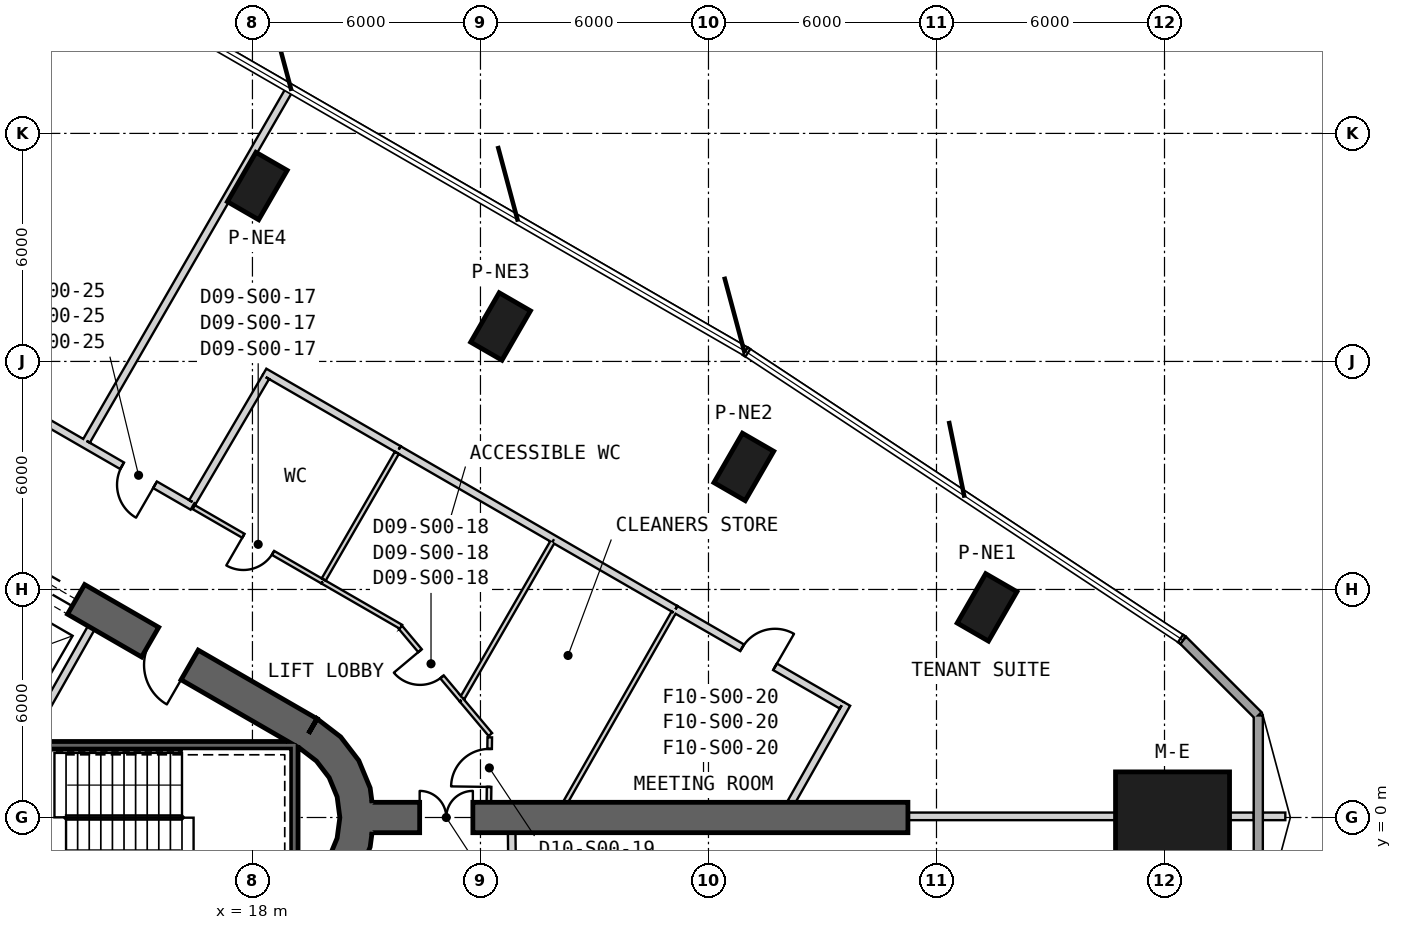
"""IFC4 building model, lengths in metres.
Left out: names, types, materials, properties, quantities, classifications, styles, units other than length and angle.
Written with IfcOpenShell. Run it as: python <this file> out.ifc"""

import sys

from ifc_helpers import new_model, si_unit, direction, frame, frame_2d, origin, origin_2d, place, context, subcontext, project, spatial, polyline, rectangle, outline, extrude, element, fill, save


model = new_model("IFC4")
c1 = context("Model", 3, precision=1e-05, world=origin(), true_north=direction((0.0, 1.0)))
c2 = subcontext(c1, "Body", "Model", "MODEL_VIEW")
j1 = project(units=[si_unit("LENGTHUNIT", "METRE"), si_unit("PLANEANGLEUNIT", "RADIAN")], contexts=[c1])
p1 = place(None, origin())
s1 = spatial("IfcSite", under=j1, at=p1, CompositionType="ELEMENT")
p2 = place(p1, origin())
s2 = spatial("IfcBuilding", under=s1, at=p2, CompositionType="ELEMENT")
p3 = place(p2, frame((0.0, 0.0, 45.5)))
s3 = spatial("IfcBuildingStorey", under=s2, at=p3, CompositionType="ELEMENT", Elevation=45.5)
p4 = place(p3, frame((42.211, 0.0, 0.0), z_axis=(0.0, 0.0, 1.0), x_axis=(1.0, 0.0, 0.0)))
e1 = element("IfcColumn", 1, at=p4, inside=s3, PredefinedType="COLUMN", context=c2, shape_type="SweptSolid", body=[
    extrude(rectangle(XDim=3.0, YDim=2.4, at=origin_2d()), origin(), (0.0, 0.0, 1.0), 4.1),
])
for number, where, z_axis, x_axis in (
    (2, (37.331, 5.528, 0.0), (0.0, 0.0, 1.0), (0.5, 0.866, 0.0)),
    (3, (30.93, 9.224, 0.0), (0.0, 0.0, 1.0), (0.5, 0.866, 0.0)),
    (4, (24.529, 12.92, 0.0), (0.0, 0.0, 1.0), (0.5, 0.866, 0.0)),
):
    element("IfcColumn", number, at=place(p3, frame(where, z_axis=z_axis, x_axis=x_axis)), inside=s3, PredefinedType="COLUMN", context=c2, shape_type="SweptSolid", body=[
        extrude(rectangle(XDim=1.5, YDim=0.95, at=origin_2d()), origin(), (0.0, 0.0, 1.0), 4.1),
    ])
p5 = place(p3, frame((18.128, 16.615, -0.3), z_axis=(0.0, 0.0, 1.0), x_axis=(0.5, 0.866025403784, 0.0)))
e5 = element("IfcColumn", 5, at=p5, inside=s3, PredefinedType="COLUMN", context=c2, shape_type="SweptSolid", body=[
    extrude(rectangle(XDim=1.5, YDim=0.95, at=origin_2d()), origin(), (0.0, 0.0, 1.0), 4.4),
])
p6 = place(p3, frame((19.475, 2.208, 0.0), z_axis=(0.0, 0.0, 1.0), x_axis=(-0.866028369851, 0.499994862586, 0.0)))
e6 = element("IfcWall", 6, at=p6, inside=s3, PredefinedType="SHEAR", context=c2, shape_type="SweptSolid", body=[
    extrude(rectangle(XDim=31.523, YDim=0.9, at=frame_2d((15.762, 0.0))), origin(), (0.0, 0.0, 1.0), 4.1),
])
p7 = place(p6, frame((7.062, 0.0, 0.0)))
e7 = element("IfcOpeningElement", 7, at=p7, cuts=e6, PredefinedType="OPENING", context=c2, shape_type="SweptSolid", body=[
    extrude(rectangle(XDim=1.2, YDim=2.4, at=frame_2d((0.6, 1.2))), frame((0.0, 0.46, 0.0), z_axis=(0.0, -1.0, 0.0), x_axis=(1.0, 0.0, 0.0)), (0.0, 0.0, 1.0), 0.92),
])
p8 = place(p6, frame((9.762, 0.0, 0.0)))
e8 = element("IfcOpeningElement", 8, at=p8, cuts=e6, PredefinedType="OPENING", context=c2, shape_type="SweptSolid", body=[
    extrude(rectangle(XDim=1.2, YDim=2.4, at=frame_2d((0.6, 1.2))), frame((0.0, 0.46, 0.0), z_axis=(0.0, -1.0, 0.0), x_axis=(1.0, 0.0, 0.0)), (0.0, 0.0, 1.0), 0.92),
])
p9 = place(p6, frame((12.462, 0.0, 0.0)))
e9 = element("IfcOpeningElement", 9, at=p9, cuts=e6, PredefinedType="OPENING", context=c2, shape_type="SweptSolid", body=[
    extrude(rectangle(XDim=1.2, YDim=2.4, at=frame_2d((0.6, 1.2))), frame((0.0, 0.46, 0.0), z_axis=(0.0, -1.0, 0.0), x_axis=(1.0, 0.0, 0.0)), (0.0, 0.0, 1.0), 0.92),
])
p10 = place(p6, frame((15.162, 0.0, 0.0)))
e10 = element("IfcOpeningElement", 10, at=p10, cuts=e6, PredefinedType="OPENING", context=c2, shape_type="SweptSolid", body=[
    extrude(rectangle(XDim=1.2, YDim=2.4, at=frame_2d((0.6, 1.2))), frame((0.0, 0.46, 0.0), z_axis=(0.0, -1.0, 0.0), x_axis=(1.0, 0.0, 0.0)), (0.0, 0.0, 1.0), 0.92),
])
p11 = place(p6, frame((17.862, 0.0, 0.0)))
e11 = element("IfcOpeningElement", 11, at=p11, cuts=e6, PredefinedType="OPENING", context=c2, shape_type="SweptSolid", body=[
    extrude(rectangle(XDim=1.2, YDim=2.4, at=frame_2d((0.6, 1.2))), frame((0.0, 0.46, 0.0), z_axis=(0.0, -1.0, 0.0), x_axis=(1.0, 0.0, 0.0)), (0.0, 0.0, 1.0), 0.92),
])
p12 = place(p6, frame((20.562, 0.0, 0.0)))
e12 = element("IfcOpeningElement", 12, at=p12, cuts=e6, PredefinedType="OPENING", context=c2, shape_type="SweptSolid", body=[
    extrude(rectangle(XDim=1.2, YDim=2.4, at=frame_2d((0.6, 1.2))), frame((0.0, 0.46, 0.0), z_axis=(0.0, -1.0, 0.0), x_axis=(1.0, 0.0, 0.0)), (0.0, 0.0, 1.0), 0.92),
])
p13 = place(p6, frame((23.262, 0.0, 0.0)))
e13 = element("IfcOpeningElement", 13, at=p13, cuts=e6, PredefinedType="OPENING", context=c2, shape_type="SweptSolid", body=[
    extrude(rectangle(XDim=1.2, YDim=2.4, at=frame_2d((0.6, 1.2))), frame((0.0, 0.46, 0.0), z_axis=(0.0, -1.0, 0.0), x_axis=(1.0, 0.0, 0.0)), (0.0, 0.0, 1.0), 0.92),
])
p14 = place(p6, frame((3.612, 0.0, 0.0)))
e14 = element("IfcOpeningElement", 14, at=p14, cuts=e6, PredefinedType="OPENING", context=c2, shape_type="SweptSolid", body=[
    extrude(rectangle(XDim=1.2, YDim=2.4, at=frame_2d((0.6, 1.2))), frame((0.0, 0.46, 0.0), z_axis=(0.0, -1.0, 0.0), x_axis=(1.0, 0.0, 0.0)), (0.0, 0.0, 1.0), 0.92),
])
p15 = place(p6, frame((26.712, 0.0, 0.0)))
e15 = element("IfcOpeningElement", 15, at=p15, cuts=e6, PredefinedType="OPENING", context=c2, shape_type="SweptSolid", body=[
    extrude(rectangle(XDim=1.2, YDim=2.4, at=frame_2d((0.6, 1.2))), frame((0.0, 0.46, 0.0), z_axis=(0.0, -1.0, 0.0), x_axis=(1.0, 0.0, 0.0)), (0.0, 0.0, 1.0), 0.92),
])
p16 = place(p3, origin())
e16 = element("IfcWall", 16, at=p16, inside=s3, PredefinedType="SHEAR", context=c2, shape_type="SweptSolid", body=[
    extrude(outline(polyline([(19.7, -2.598), (20.321, -2.121), (20.798, -1.5), (21.098, -0.777), (21.2, 0.0), (21.098, 0.777), (20.798, 1.5), (20.321, 2.121), (19.7, 2.598), (19.25, 1.819), (19.685, 1.485), (20.019, 1.05), (20.229, 0.543), (20.3, 0.0), (20.229, -0.543), (20.019, -1.05), (19.685, -1.485), (19.25, -1.819), (19.7, -2.598)])), origin(), (0.0, 0.0, 1.0), 4.1),
])
p17 = place(p3, frame((21.15, 0.0, 0.0), z_axis=(0.0, 0.0, 1.0), x_axis=(1.0, 0.0, 0.0)))
e17 = element("IfcWall", 17, at=p17, inside=s3, PredefinedType="SHEAR", context=c2, shape_type="SweptSolid", body=[
    extrude(rectangle(XDim=14.098, YDim=0.8, at=frame_2d((7.049, 0.0))), origin(), (0.0, 0.0, 1.0), 4.1),
])
p18 = place(p17, frame((1.25, 0.0, 0.0)))
e18 = element("IfcOpeningElement", 18, at=p18, cuts=e17, PredefinedType="OPENING", context=c2, shape_type="SweptSolid", body=[
    extrude(rectangle(XDim=1.4, YDim=2.4, at=frame_2d((0.7, 1.2))), frame((0.0, 0.41, 0.0), z_axis=(0.0, -1.0, 0.0), x_axis=(1.0, 0.0, 0.0)), (0.0, 0.0, 1.0), 0.82),
])
p19 = place(p3, frame((44.468, -2.686, 0.0), z_axis=(0.0, 0.0, 1.0), x_axis=(0.0, 1.0, 0.0)))
e19 = element("IfcWall", 19, at=p19, inside=s3, PredefinedType="SOLIDWALL", context=c2, shape_type="SweptSolid", body=[
    extrude(rectangle(XDim=5.371, YDim=0.24, at=frame_2d((2.686, 0.0))), origin(), (0.0, 0.0, 1.0), 3.8),
])
p20 = place(p3, frame((44.468, 2.686, 0.0), z_axis=(0.0, 0.0, 1.0), x_axis=(-0.707106781187, 0.707106781187, 0.0)))
e20 = element("IfcWall", 20, at=p20, inside=s3, PredefinedType="SOLIDWALL", context=c2, shape_type="SweptSolid", body=[
    extrude(rectangle(XDim=2.801, YDim=0.24, at=frame_2d((1.4, 0.0))), origin(), (0.0, 0.0, 1.0), 3.8),
])
p21 = place(p3, frame((12.11, 2.073, 0.0), z_axis=(0.0, 0.0, 1.0), x_axis=(0.49196600604, 0.870614408852, 0.0)))
e21 = element("IfcWall", 21, at=p21, inside=s3, PredefinedType="PLUMBINGWALL", context=c2, shape_type="SweptSolid", body=[
    extrude(rectangle(XDim=3.35, YDim=0.2, at=frame_2d((1.675, 0.0))), origin(), (0.0, 0.0, 1.0), 3.8),
])
p22 = place(p3, frame((19.2, 1.9, -0.3), z_axis=(0.0, 0.0, 1.0), x_axis=(-1.0, 0.0, 0.0)))
e22 = element("IfcWall", 22, at=p22, inside=s3, PredefinedType="SHEAR", context=c2, shape_type="SweptSolid", body=[
    extrude(rectangle(XDim=8.1, YDim=0.2, at=frame_2d((4.05, 0.0))), origin(), (0.0, 0.0, 1.0), 4.1),
])
p23 = place(p3, frame((19.1, -2.0, -0.3), z_axis=(0.0, 0.0, 1.0), x_axis=(0.0, 1.0, 0.0)))
e23 = element("IfcWall", 23, at=p23, inside=s3, PredefinedType="SHEAR", context=c2, shape_type="SweptSolid", body=[
    extrude(rectangle(XDim=3.8, YDim=0.2, at=frame_2d((1.9, 0.0))), origin(), (0.0, 0.0, 1.0), 4.1),
])
p24 = place(p3, frame((16.423, 8.185, 0.0), z_axis=(0.0, 0.0, 1.0), x_axis=(-0.866026561282, 0.49999799515, 0.0)))
e24 = element("IfcWall", 24, at=p24, inside=s3, PredefinedType="PARTITIONING", context=c2, shape_type="SweptSolid", body=[
    extrude(rectangle(XDim=26.435, YDim=0.2, at=frame_2d((13.218, 0.0))), origin(), (0.0, 0.0, 1.0), 2.98),
])
p25 = place(p24, frame((14.356, 0.0, 0.0)))
e25 = element("IfcOpeningElement", 25, at=p25, cuts=e24, PredefinedType="OPENING", context=c2, shape_type="SweptSolid", body=[
    extrude(rectangle(XDim=1.0, YDim=2.1, at=frame_2d((0.5, 1.05))), frame((0.0, 0.11, 0.0), z_axis=(0.0, -1.0, 0.0), x_axis=(1.0, 0.0, 0.0)), (0.0, 0.0, 1.0), 0.22),
])
p26 = place(p24, frame((1.139, 0.0, 0.0)))
e26 = element("IfcOpeningElement", 26, at=p26, cuts=e24, PredefinedType="OPENING", context=c2, shape_type="SweptSolid", body=[
    extrude(rectangle(XDim=1.0, YDim=2.1, at=frame_2d((0.5, 1.05))), frame((0.0, 0.11, 0.0), z_axis=(0.0, -1.0, 0.0), x_axis=(1.0, 0.0, 0.0)), (0.0, 0.0, 1.0), 0.22),
])
p27 = place(p3, frame((21.909, 5.018, 0.0), z_axis=(0.0, 0.0, 1.0), x_axis=(-0.866054279967, 0.499949981648, 0.0)))
e27 = element("IfcWall", 27, at=p27, inside=s3, PredefinedType="PARTITIONING", context=c2, shape_type="SweptSolid", body=[
    extrude(rectangle(XDim=2.384, YDim=0.12, at=frame_2d((1.192, 0.0))), origin(), (0.0, 0.0, 1.0), 2.98),
])
p28 = place(p3, frame((19.845, 6.209, 0.0), z_axis=(0.0, 0.0, 1.0), x_axis=(-0.866002635216, 0.500039434245, 0.0)))
e28 = element("IfcWall", 28, at=p28, inside=s3, PredefinedType="PARTITIONING", context=c2, shape_type="SweptSolid", body=[
    extrude(rectangle(XDim=3.911, YDim=0.12, at=frame_2d((1.956, 0.0))), origin(), (0.0, 0.0, 1.0), 3.8),
])
p29 = place(p28, frame((1.506, 0.0, 0.0)))
e29 = element("IfcOpeningElement", 29, at=p29, cuts=e28, PredefinedType="OPENING", context=c2, shape_type="SweptSolid", body=[
    extrude(rectangle(XDim=0.9, YDim=2.1, at=frame_2d((0.45, 1.05))), frame((0.0, 0.07, 0.0), z_axis=(0.0, -1.0, 0.0), x_axis=(1.0, 0.0, 0.0)), (0.0, 0.0, 1.0), 0.14),
])
p30 = place(p3, frame((24.26, 2.184, 0.0), z_axis=(0.0, 0.0, 1.0), x_axis=(-0.642765036977, 0.766063383304, 0.0)))
e30 = element("IfcWall", 30, at=p30, inside=s3, PredefinedType="PARTITIONING", context=c2, shape_type="SweptSolid", body=[
    extrude(rectangle(XDim=1.18, YDim=0.12, at=frame_2d((0.59, 0.0))), origin(), (0.0, 0.0, 1.0), 3.8),
])
p31 = place(p3, frame((23.502, 3.088, 0.0), z_axis=(0.0, 0.0, 1.0), x_axis=(-0.642756581794, 0.766070477541, 0.0)))
e31 = element("IfcWall", 31, at=p31, inside=s3, PredefinedType="PARTITIONING", context=c2, shape_type="SweptSolid", body=[
    extrude(rectangle(XDim=2.499, YDim=0.12, at=frame_2d((1.249, 0.0))), origin(), (0.0, 0.0, 1.0), 2.88),
])
p32 = place(p31, frame((0.799, 0.0, 0.0)))
e32 = element("IfcOpeningElement", 32, at=p32, cuts=e31, PredefinedType="OPENING", context=c2, shape_type="SweptSolid", body=[
    extrude(rectangle(XDim=0.9, YDim=2.1, at=frame_2d((0.45, 1.05))), frame((0.0, 0.07, 0.0), z_axis=(0.0, -1.0, 0.0), x_axis=(1.0, 0.0, 0.0)), (0.0, 0.0, 1.0), 0.14),
])
p33 = place(p3, frame((24.222, 0.4, 0.0), z_axis=(0.0, 0.0, 1.0), x_axis=(0.013570178926, 0.999907920883, 0.0)))
e33 = element("IfcWall", 33, at=p33, inside=s3, PredefinedType="PARTITIONING", context=c2, shape_type="SweptSolid", body=[
    extrude(rectangle(XDim=1.709, YDim=0.12, at=frame_2d((0.854, 0.0))), origin(), (0.0, 0.0, 1.0), 3.8),
])
p34 = place(p33, frame((0.405, 0.0, 0.0)))
e34 = element("IfcOpeningElement", 34, at=p34, cuts=e33, PredefinedType="OPENING", context=c2, shape_type="SweptSolid", body=[
    extrude(rectangle(XDim=1.0, YDim=2.1, at=frame_2d((0.5, 1.05))), frame((0.0, 0.07, 0.0), z_axis=(0.0, -1.0, 0.0), x_axis=(1.0, 0.0, 0.0)), (0.0, 0.0, 1.0), 0.14),
])
p35 = place(p3, frame((24.848, -2.535, 0.0), z_axis=(0.0, 0.0, 1.0), x_axis=(-0.012347560796, 0.999923765965, 0.0)))
e35 = element("IfcWall", 35, at=p35, inside=s3, PredefinedType="PARTITIONING", context=c2, shape_type="SweptSolid", body=[
    extrude(rectangle(XDim=2.135, YDim=0.2, at=frame_2d((1.068, 0.0))), origin(), (0.0, 0.0, 1.0), 3.8),
])
p36 = place(p3, frame((13.635, 9.911, 0.0), z_axis=(0.0, 0.0, 1.0), x_axis=(0.499942170756, 0.86605878894, 0.0)))
e36 = element("IfcWall", 36, at=p36, inside=s3, PredefinedType="PARTITIONING", context=c2, shape_type="SweptSolid", body=[
    extrude(rectangle(XDim=10.709, YDim=0.2, at=frame_2d((5.354, 0.0))), origin(), (0.0, 0.0, 1.0), 3.08),
])
p37 = place(p3, frame((45.179, 0.03, 0.0), z_axis=(0.0, 0.0, 1.0), x_axis=(-1.0, 0.0, 0.0)))
e37 = element("IfcWall", 37, at=p37, inside=s3, PredefinedType="PARTITIONING", context=c2, shape_type="SweptSolid", body=[
    extrude(rectangle(XDim=0.592, YDim=0.2, at=frame_2d((0.296, 0.0))), origin(), (0.0, 0.0, 1.0), 3.8),
])
p38 = place(p3, frame((44.347, 0.03, 0.0), z_axis=(0.0, 0.0, 1.0), x_axis=(-1.0, 0.0, 0.0)))
e38 = element("IfcWall", 38, at=p38, inside=s3, PredefinedType="PARTITIONING", context=c2, shape_type="SweptSolid", body=[
    extrude(rectangle(XDim=0.636, YDim=0.2, at=frame_2d((0.318, 0.0))), origin(), (0.0, 0.0, 1.0), 3.8),
])
p39 = place(p3, frame((40.711, 0.03, 0.0), z_axis=(0.0, 0.0, 1.0), x_axis=(-1.0, 0.0, 0.0)))
e39 = element("IfcWall", 39, at=p39, inside=s3, PredefinedType="PARTITIONING", context=c2, shape_type="SweptSolid", body=[
    extrude(rectangle(XDim=5.463, YDim=0.2, at=frame_2d((2.731, 0.0))), origin(), (0.0, 0.0, 1.0), 3.37),
])
p40 = place(p3, frame((18.315, 11.723, 0.0), z_axis=(0.0, 0.0, 1.0), x_axis=(0.866048124097, -0.4999606452, 0.0)))
e40 = element("IfcWall", 40, at=p40, inside=s3, PredefinedType="PARTITIONING", context=c2, shape_type="SweptSolid", body=[
    extrude(rectangle(XDim=4.081, YDim=0.2, at=frame_2d((2.041, 0.0))), origin(), (0.0, 0.0, 1.0), 2.98),
])
p41 = place(p3, frame((21.85, 9.682, 0.0), z_axis=(0.0, 0.0, 1.0), x_axis=(0.866018431725, -0.500012075767, 0.0)))
e41 = element("IfcWall", 41, at=p41, inside=s3, PredefinedType="PARTITIONING", context=c2, shape_type="SweptSolid", body=[
    extrude(rectangle(XDim=4.719, YDim=0.2, at=frame_2d((2.359, 0.0))), origin(), (0.0, 0.0, 1.0), 2.98),
])
p42 = place(p3, frame((25.936, 7.323, 0.0), z_axis=(0.0, 0.0, 1.0), x_axis=(0.866035727774, -0.499982117899, 0.0)))
e42 = element("IfcWall", 42, at=p42, inside=s3, PredefinedType="PARTITIONING", context=c2, shape_type="SweptSolid", body=[
    extrude(rectangle(XDim=3.69, YDim=0.2, at=frame_2d((1.845, 0.0))), origin(), (0.0, 0.0, 1.0), 3.8),
])
p43 = place(p3, frame((29.132, 5.478, 0.0), z_axis=(0.0, 0.0, 1.0), x_axis=(0.866009287374, -0.500027913402, 0.0)))
e43 = element("IfcWall", 43, at=p43, inside=s3, PredefinedType="PARTITIONING", context=c2, shape_type="SweptSolid", body=[
    extrude(rectangle(XDim=5.051, YDim=0.2, at=frame_2d((2.525, 0.0))), origin(), (0.0, 0.0, 1.0), 2.88),
])
p44 = place(p43, frame((2.025, 0.0, 0.0)))
e44 = element("IfcOpeningElement", 44, at=p44, cuts=e43, PredefinedType="OPENING", context=c2, shape_type="SweptSolid", body=[
    extrude(rectangle(XDim=1.0, YDim=2.1, at=frame_2d((0.5, 1.05))), frame((0.0, 0.11, 0.0), z_axis=(0.0, -1.0, 0.0), x_axis=(1.0, 0.0, 0.0)), (0.0, 0.0, 1.0), 0.22),
])
p45 = place(p3, frame((18.351, 11.587, 0.0), z_axis=(0.0, 0.0, 1.0), x_axis=(-0.506482355277, -0.862250325482, 0.0)))
e45 = element("IfcWall", 45, at=p45, inside=s3, PredefinedType="PARTITIONING", context=c2, shape_type="SweptSolid", body=[
    extrude(rectangle(XDim=3.81, YDim=0.2, at=frame_2d((1.905, 0.0))), origin(), (0.0, 0.0, 1.0), 2.98),
])
p46 = place(p3, frame((32.177, 0.4, 0.0), z_axis=(0.0, 0.0, 1.0), x_axis=(0.492157292939, 0.870506288895, 0.0)))
e46 = element("IfcWall", 46, at=p46, inside=s3, PredefinedType="PARTITIONING", context=c2, shape_type="SweptSolid", body=[
    extrude(rectangle(XDim=2.975, YDim=0.2, at=frame_2d((1.488, 0.0))), origin(), (0.0, 0.0, 1.0), 3.8),
])
p47 = place(p3, frame((21.8, 9.596, 0.0), z_axis=(0.0, 0.0, 1.0), x_axis=(-0.500006057782, -0.866021906294, 0.0)))
e47 = element("IfcWall", 47, at=p47, inside=s3, PredefinedType="PARTITIONING", context=c2, shape_type="SweptSolid", body=[
    extrude(rectangle(XDim=3.85, YDim=0.12, at=frame_2d((1.925, 0.0))), origin(), (0.0, 0.0, 1.0), 3.8),
])
p48 = place(p3, frame((25.886, 7.236, 0.0), z_axis=(0.0, 0.0, 1.0), x_axis=(-0.500001678427, -0.866024434742, 0.0)))
e48 = element("IfcWall", 48, at=p48, inside=s3, PredefinedType="PARTITIONING", context=c2, shape_type="SweptSolid", body=[
    extrude(rectangle(XDim=4.718, YDim=0.12, at=frame_2d((2.359, 0.0))), origin(), (0.0, 0.0, 1.0), 2.88),
])
p49 = place(p3, frame((29.082, 5.391, 0.0), z_axis=(0.0, 0.0, 1.0), x_axis=(-0.495278409735, -0.868734307398, 0.0)))
e49 = element("IfcWall", 49, at=p49, inside=s3, PredefinedType="PARTITIONING", context=c2, shape_type="SweptSolid", body=[
    extrude(rectangle(XDim=5.746, YDim=0.12, at=frame_2d((2.873, 0.0))), origin(), (0.0, 0.0, 1.0), 2.88),
])
p50 = place(p29, origin())
e50 = element("IfcDoor", 50, at=p50, inside=s3, OperationType="SINGLE_SWING_LEFT", PredefinedType="NOTDEFINED", context=c2, shape_type="SweptSolid", body=[
    extrude(rectangle(XDim=0.9, YDim=2.1, at=frame_2d((0.45, 1.05))), frame((0.0, 0.025, 0.0), z_axis=(0.0, -1.0, 0.0), x_axis=(1.0, 0.0, 0.0)), (0.0, 0.0, 1.0), 0.05),
])
fill(e29, e50)
p51 = place(p32, origin())
e51 = element("IfcDoor", 51, at=p51, inside=s3, OperationType="SINGLE_SWING_RIGHT", PredefinedType="NOTDEFINED", context=c2, shape_type="SweptSolid", body=[
    extrude(rectangle(XDim=0.9, YDim=2.1, at=frame_2d((0.45, 1.05))), frame((0.0, 0.025, 0.0), z_axis=(0.0, -1.0, 0.0), x_axis=(1.0, 0.0, 0.0)), (0.0, 0.0, 1.0), 0.05),
])
fill(e32, e51)
p52 = place(p34, origin())
e52 = element("IfcDoor", 52, at=p52, inside=s3, OperationType="SINGLE_SWING_LEFT", PredefinedType="NOTDEFINED", context=c2, shape_type="SweptSolid", body=[
    extrude(rectangle(XDim=1.0, YDim=2.1, at=frame_2d((0.5, 1.05))), frame((0.0, 0.025, 0.0), z_axis=(0.0, -1.0, 0.0), x_axis=(1.0, 0.0, 0.0)), (0.0, 0.0, 1.0), 0.05),
])
fill(e34, e52)
p53 = place(p44, origin())
e53 = element("IfcDoor", 53, at=p53, inside=s3, OperationType="SINGLE_SWING_LEFT", PredefinedType="USERDEFINED", context=c2, shape_type="SweptSolid", body=[
    extrude(rectangle(XDim=1.0, YDim=2.1, at=frame_2d((0.5, 1.05))), frame((0.0, 0.025, 0.0), z_axis=(0.0, -1.0, 0.0), x_axis=(1.0, 0.0, 0.0)), (0.0, 0.0, 1.0), 0.05),
])
fill(e44, e53)
p54 = place(p26, origin())
e54 = element("IfcDoor", 54, at=p54, inside=s3, OperationType="SINGLE_SWING_RIGHT", PredefinedType="USERDEFINED", context=c2, shape_type="SweptSolid", body=[
    extrude(rectangle(XDim=1.0, YDim=2.1, at=frame_2d((0.5, 1.05))), frame((0.0, 0.025, 0.0), z_axis=(0.0, -1.0, 0.0), x_axis=(1.0, 0.0, 0.0)), (0.0, 0.0, 1.0), 0.05),
])
fill(e26, e54)
p55 = place(p7, origin())
e55 = element("IfcDoor", 55, at=p55, inside=s3, OperationType="SLIDING_TO_LEFT", PredefinedType="USERDEFINED", context=c2, shape_type="SweptSolid", body=[
    extrude(rectangle(XDim=1.2, YDim=2.4, at=frame_2d((0.6, 1.2))), frame((0.0, 0.025, 0.0), z_axis=(0.0, -1.0, 0.0), x_axis=(1.0, 0.0, 0.0)), (0.0, 0.0, 1.0), 0.05),
])
fill(e7, e55)
p56 = place(p14, origin())
e56 = element("IfcDoor", 56, at=p56, inside=s3, OperationType="SINGLE_SWING_LEFT", PredefinedType="USERDEFINED", context=c2, shape_type="SweptSolid", body=[
    extrude(rectangle(XDim=1.2, YDim=2.4, at=frame_2d((0.6, 1.2))), frame((0.0, 0.025, 0.0), z_axis=(0.0, -1.0, 0.0), x_axis=(1.0, 0.0, 0.0)), (0.0, 0.0, 1.0), 0.05),
])
fill(e14, e56)
p57 = place(p18, origin())
e57 = element("IfcDoor", 57, at=p57, inside=s3, OperationType="DOUBLE_DOOR_SINGLE_SWING", PredefinedType="NOTDEFINED", context=c2, shape_type="SweptSolid", body=[
    extrude(rectangle(XDim=1.4, YDim=2.4, at=frame_2d((0.7, 1.2))), frame((0.0, 0.025, 0.0), z_axis=(0.0, -1.0, 0.0), x_axis=(1.0, 0.0, 0.0)), (0.0, 0.0, 1.0), 0.05),
])
fill(e18, e57)
save(model, sys.argv[1])
